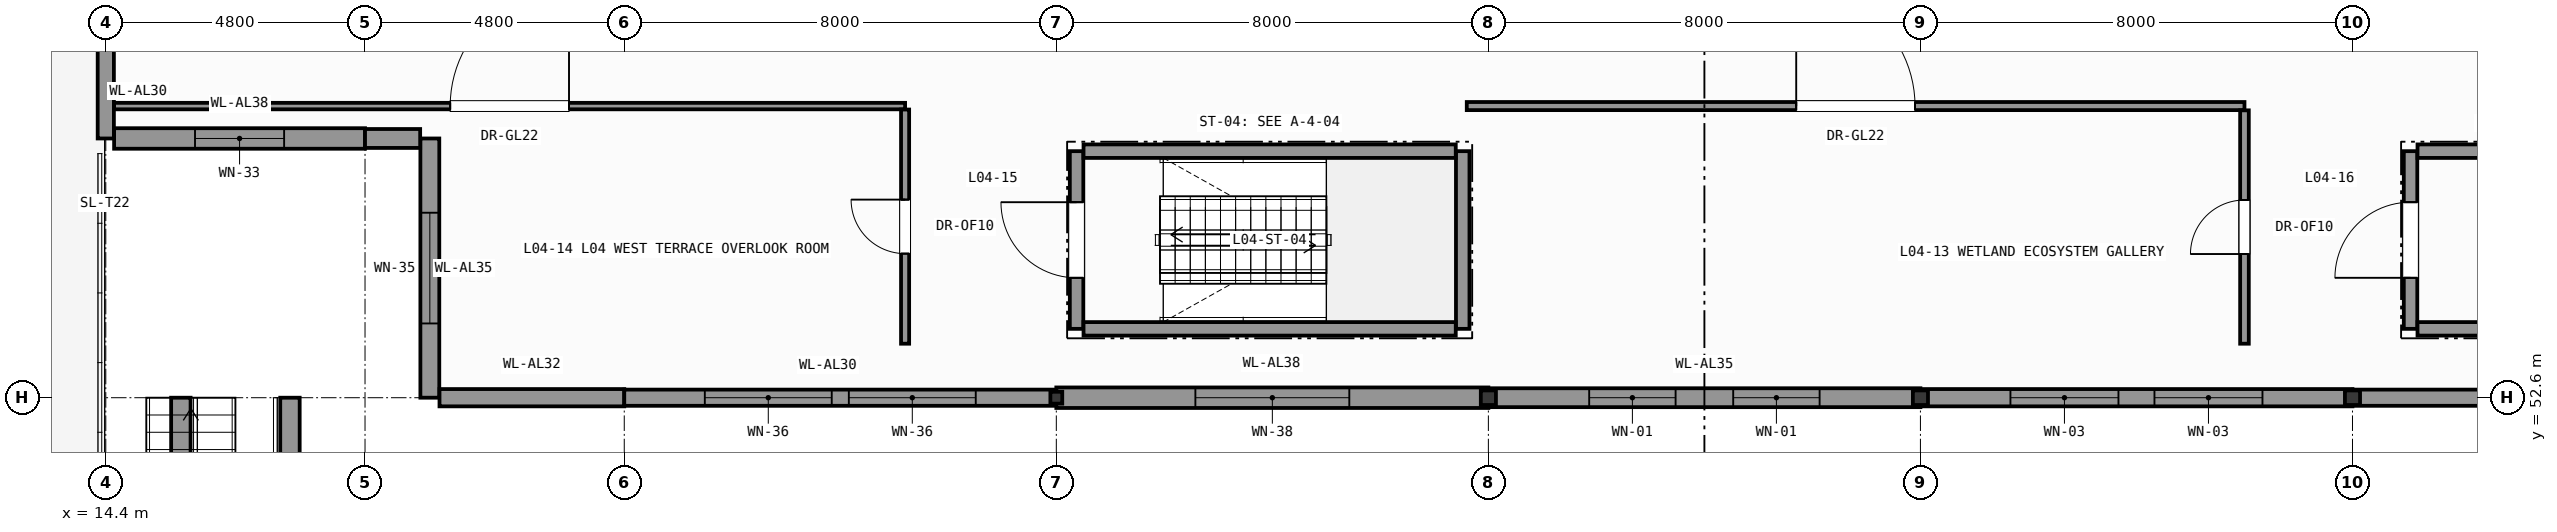
"""IFC4 building model, lengths in metres.
Left out: names, types, materials, properties, quantities, classifications, styles, units other than length and angle.
Written with IfcOpenShell. Run it as: python <this file> out.ifc"""

import sys

from ifc_helpers import new_model, si_unit, direction, frame, frame_2d, origin, origin_2d, place, context, subcontext, project, spatial, polyline, rectangle, hollow_rectangle, i_section, outline, extrude, element, fill, save


model = new_model("IFC4")
c1 = context("Model", 3, precision=1e-05, world=origin(), true_north=direction((0.0, 1.0)))
c2 = subcontext(c1, "Body", "Model", "MODEL_VIEW")
j1 = project(units=[si_unit("LENGTHUNIT", "METRE"), si_unit("PLANEANGLEUNIT", "RADIAN")], contexts=[c1])
p1 = place(None, origin())
s1 = spatial("IfcSite", under=j1, at=p1, CompositionType="ELEMENT")
p2 = place(p1, origin())
s2 = spatial("IfcBuilding", under=s1, at=p2, CompositionType="ELEMENT")
p3 = place(p2, frame((0.0, 0.0, 18.0)))
s3 = spatial("IfcBuildingStorey", under=s2, at=p3, CompositionType="ELEMENT", Elevation=18.0)
p4 = place(p3, frame((32.0, 52.6, 0.0), z_axis=(0.0, 0.0, 1.0), x_axis=(1.0, 0.0, 0.0)))
e1 = element("IfcColumn", 1, at=p4, inside=s3, PredefinedType="COLUMN", context=c2, shape_type="SweptSolid", body=[
    extrude(hollow_rectangle(XDim=0.22, YDim=0.22, WallThickness=0.012, InnerFilletRadius=0.012, OuterFilletRadius=0.024, at=origin_2d()), origin(), (0.0, 0.0, 1.0), 4.2),
])
for number, where, z_axis, x_axis in (
    (2, (40.0, 52.6, 0.0), (0.0, 0.0, 1.0), (1.0, 0.0, 0.0)),
    (3, (48.0, 52.6, 0.0), (0.0, 0.0, 1.0), (1.0, 0.0, 0.0)),
    (4, (56.0, 52.6, 0.0), (0.0, 0.0, 1.0), (1.0, 0.0, 0.0)),
):
    element("IfcColumn", number, at=place(p3, frame(where, z_axis=z_axis, x_axis=x_axis)), inside=s3, PredefinedType="COLUMN", context=c2, shape_type="SweptSolid", body=[
        extrude(i_section(OverallWidth=0.28, OverallDepth=0.27, WebThickness=0.008, FlangeThickness=0.013, FilletRadius=0.024, at=origin_2d()), origin(), (0.0, 0.0, 1.0), 4.2),
    ])
p5 = place(p3, frame((20.4, 52.6, 0.0), z_axis=(0.0, 0.0, 1.0), x_axis=(0.0, 1.0, 0.0)))
e5 = element("IfcWall", 5, at=p5, inside=s3, PredefinedType="SOLIDWALL", context=c2, shape_type="SweptSolid", body=[
    extrude(rectangle(XDim=4.8, YDim=0.35, at=frame_2d((2.4, 0.0))), origin(), (0.0, 0.0, 1.0), 3.98),
])
p6 = place(p5, frame((1.375, 0.0, 0.95)))
e6 = element("IfcOpeningElement", 6, at=p6, cuts=e5, PredefinedType="OPENING", context=c2, shape_type="SweptSolid", body=[
    extrude(rectangle(XDim=2.05, YDim=2.63, at=frame_2d((1.025, 1.315))), frame((0.0, 0.185, 0.0), z_axis=(0.0, -1.0, 0.0), x_axis=(1.0, 0.0, 0.0)), (0.0, 0.0, 1.0), 0.37),
])
p7 = place(p3, frame((24.0, 52.6, 0.0), z_axis=(0.0, 0.0, 1.0), x_axis=(-1.0, 0.0, 0.0)))
e7 = element("IfcWall", 7, at=p7, inside=s3, PredefinedType="SOLIDWALL", context=c2, shape_type="SweptSolid", body=[
    extrude(rectangle(XDim=3.421, YDim=0.32, at=frame_2d((1.71, 0.0))), origin(), (0.0, 0.0, 1.0), 3.98),
])
p8 = place(p3, frame((32.0, 52.6, 0.0), z_axis=(0.0, 0.0, 1.0), x_axis=(-1.0, 0.0, 0.0)))
e8 = element("IfcWall", 8, at=p8, inside=s3, PredefinedType="SOLIDWALL", context=c2, shape_type="SweptSolid", body=[
    extrude(rectangle(XDim=8.0, YDim=0.3, at=frame_2d((4.0, 0.0))), origin(), (0.0, 0.0, 1.0), 3.98),
])
p9 = place(p8, frame((1.492, 0.0, 0.95)))
e9 = element("IfcOpeningElement", 9, at=p9, cuts=e8, PredefinedType="OPENING", context=c2, shape_type="SweptSolid", body=[
    extrude(rectangle(XDim=2.35, YDim=2.63, at=frame_2d((1.175, 1.315))), frame((0.0, 0.16, 0.0), z_axis=(0.0, -1.0, 0.0), x_axis=(1.0, 0.0, 0.0)), (0.0, 0.0, 1.0), 0.32),
])
p10 = place(p8, frame((4.158, 0.0, 0.95)))
e10 = element("IfcOpeningElement", 10, at=p10, cuts=e8, PredefinedType="OPENING", context=c2, shape_type="SweptSolid", body=[
    extrude(rectangle(XDim=2.35, YDim=2.63, at=frame_2d((1.175, 1.315))), frame((0.0, 0.16, 0.0), z_axis=(0.0, -1.0, 0.0), x_axis=(1.0, 0.0, 0.0)), (0.0, 0.0, 1.0), 0.32),
])
p11 = place(p3, frame((40.0, 52.6, 0.0), z_axis=(0.0, 0.0, 1.0), x_axis=(-1.0, 0.0, 0.0)))
e11 = element("IfcWall", 11, at=p11, inside=s3, PredefinedType="SOLIDWALL", context=c2, shape_type="SweptSolid", body=[
    extrude(rectangle(XDim=8.0, YDim=0.38, at=frame_2d((4.0, 0.0))), origin(), (0.0, 0.0, 1.0), 3.685),
])
p12 = place(p11, frame((2.575, 0.0, 0.95)))
e12 = element("IfcOpeningElement", 12, at=p12, cuts=e11, PredefinedType="OPENING", context=c2, shape_type="SweptSolid", body=[
    extrude(rectangle(XDim=2.85, YDim=2.33, at=frame_2d((1.425, 1.165))), frame((0.0, 0.2, 0.0), z_axis=(0.0, -1.0, 0.0), x_axis=(1.0, 0.0, 0.0)), (0.0, 0.0, 1.0), 0.4),
])
p13 = place(p3, frame((48.0, 52.6, 0.0), z_axis=(0.0, 0.0, 1.0), x_axis=(-1.0, 0.0, 0.0)))
e13 = element("IfcWall", 13, at=p13, inside=s3, PredefinedType="SOLIDWALL", context=c2, shape_type="SweptSolid", body=[
    extrude(rectangle(XDim=8.0, YDim=0.35, at=frame_2d((4.0, 0.0))), origin(), (0.0, 0.0, 1.0), 3.645),
])
p14 = place(p13, frame((1.867, 0.0, 0.95)))
e14 = element("IfcOpeningElement", 14, at=p14, cuts=e13, PredefinedType="OPENING", context=c2, shape_type="SweptSolid", body=[
    extrude(rectangle(XDim=1.6, YDim=2.29, at=frame_2d((0.8, 1.145))), frame((0.0, 0.185, 0.0), z_axis=(0.0, -1.0, 0.0), x_axis=(1.0, 0.0, 0.0)), (0.0, 0.0, 1.0), 0.37),
])
p15 = place(p13, frame((4.533, 0.0, 0.95)))
e15 = element("IfcOpeningElement", 15, at=p15, cuts=e13, PredefinedType="OPENING", context=c2, shape_type="SweptSolid", body=[
    extrude(rectangle(XDim=1.6, YDim=2.29, at=frame_2d((0.8, 1.145))), frame((0.0, 0.185, 0.0), z_axis=(0.0, -1.0, 0.0), x_axis=(1.0, 0.0, 0.0)), (0.0, 0.0, 1.0), 0.37),
])
p16 = place(p3, frame((56.0, 52.6, 0.0), z_axis=(0.0, 0.0, 1.0), x_axis=(-1.0, 0.0, 0.0)))
e16 = element("IfcWall", 16, at=p16, inside=s3, PredefinedType="SOLIDWALL", context=c2, shape_type="SweptSolid", body=[
    extrude(rectangle(XDim=8.0, YDim=0.32, at=frame_2d((4.0, 0.0))), origin(), (0.0, 0.0, 1.0), 3.565),
])
p17 = place(p16, frame((1.667, 0.0, 0.95)))
e17 = element("IfcOpeningElement", 17, at=p17, cuts=e16, PredefinedType="OPENING", context=c2, shape_type="SweptSolid", body=[
    extrude(rectangle(XDim=2.0, YDim=2.22, at=frame_2d((1.0, 1.11))), frame((0.0, 0.17, 0.0), z_axis=(0.0, -1.0, 0.0), x_axis=(1.0, 0.0, 0.0)), (0.0, 0.0, 1.0), 0.34),
])
p18 = place(p16, frame((4.333, 0.0, 0.95)))
e18 = element("IfcOpeningElement", 18, at=p18, cuts=e16, PredefinedType="OPENING", context=c2, shape_type="SweptSolid", body=[
    extrude(rectangle(XDim=2.0, YDim=2.22, at=frame_2d((1.0, 1.11))), frame((0.0, 0.17, 0.0), z_axis=(0.0, -1.0, 0.0), x_axis=(1.0, 0.0, 0.0)), (0.0, 0.0, 1.0), 0.34),
])
p19 = place(p3, frame((70.0, 52.6, 0.0), z_axis=(0.0, 0.0, 1.0), x_axis=(-1.0, 0.0, 0.0)))
e19 = element("IfcWall", 19, at=p19, inside=s3, PredefinedType="SOLIDWALL", context=c2, shape_type="SweptSolid", body=[
    extrude(rectangle(XDim=14.0, YDim=0.3, at=frame_2d((7.0, 0.0))), origin(), (0.0, 0.0, 1.0), 3.415),
])
p20 = place(p19, frame((3.867, 0.0, 0.95)))
e20 = element("IfcOpeningElement", 20, at=p20, cuts=e19, PredefinedType="OPENING", context=c2, shape_type="SweptSolid", body=[
    extrude(rectangle(XDim=1.6, YDim=2.06, at=frame_2d((0.8, 1.03))), frame((0.0, 0.16, 0.0), z_axis=(0.0, -1.0, 0.0), x_axis=(1.0, 0.0, 0.0)), (0.0, 0.0, 1.0), 0.32),
])
p21 = place(p19, frame((8.533, 0.0, 0.95)))
e21 = element("IfcOpeningElement", 21, at=p21, cuts=e19, PredefinedType="OPENING", context=c2, shape_type="SweptSolid", body=[
    extrude(rectangle(XDim=1.6, YDim=2.06, at=frame_2d((0.8, 1.03))), frame((0.0, 0.16, 0.0), z_axis=(0.0, -1.0, 0.0), x_axis=(1.0, 0.0, 0.0)), (0.0, 0.0, 1.0), 0.32),
])
p22 = place(p3, frame((14.4, 57.4, 0.0), z_axis=(0.0, 0.0, 1.0), x_axis=(0.0, 1.0, 0.0)))
e22 = element("IfcWall", 22, at=p22, inside=s3, PredefinedType="SOLIDWALL", context=c2, shape_type="SweptSolid", body=[
    extrude(rectangle(XDim=2.2, YDim=0.3, at=frame_2d((1.1, 0.0))), origin(), (0.0, 0.0, 1.0), 3.98),
])
p23 = place(p3, frame((19.2, 57.4, 0.0), z_axis=(0.0, 0.0, 1.0), x_axis=(-1.0, 0.0, 0.0)))
e23 = element("IfcWall", 23, at=p23, inside=s3, PredefinedType="SOLIDWALL", context=c2, shape_type="SweptSolid", body=[
    extrude(rectangle(XDim=4.646, YDim=0.38, at=frame_2d((2.323, 0.0))), origin(), (0.0, 0.0, 1.0), 3.98),
])
p24 = place(p23, frame((1.498, 0.0, 0.95)))
e24 = element("IfcOpeningElement", 24, at=p24, cuts=e23, PredefinedType="OPENING", context=c2, shape_type="SweptSolid", body=[
    extrude(rectangle(XDim=1.65, YDim=2.63, at=frame_2d((0.825, 1.315))), frame((0.0, 0.2, 0.0), z_axis=(0.0, -1.0, 0.0), x_axis=(1.0, 0.0, 0.0)), (0.0, 0.0, 1.0), 0.4),
])
p25 = place(p3, frame((20.221, 57.4, 0.0), z_axis=(0.0, 0.0, 1.0), x_axis=(-1.0, 0.0, 0.0)))
e25 = element("IfcWall", 25, at=p25, inside=s3, PredefinedType="SOLIDWALL", context=c2, shape_type="SweptSolid", body=[
    extrude(rectangle(XDim=1.021, YDim=0.35, at=frame_2d((0.51, 0.0))), origin(), (0.0, 0.0, 1.0), 3.98),
])
for number, where, z_axis, x_axis in (
    (26, (15.79, 43.71, -18.0), (0.0, 0.0, 1.0), (0.0, 1.0, 0.0)),
    (27, (17.81, 43.71, -18.0), (0.0, 0.0, 1.0), (0.0, 1.0, 0.0)),
):
    element("IfcWall", number, at=place(p3, frame(where, z_axis=z_axis, x_axis=x_axis)), inside=s3, PredefinedType="SOLIDWALL", context=c2, shape_type="SweptSolid", body=[
        extrude(outline(polyline([(0.0, 0.0), (8.89, 0.0), (8.89, 23.45), (0.0, 19.25), (0.0, 0.0)])), frame((0.0, 0.18, 0.0), z_axis=(0.0, -1.0, 0.0), x_axis=(1.0, 0.0, 0.0)), (0.0, 0.0, 1.0), 0.36),
    ])
p26 = place(p3, frame((57.075, 53.875, 0.0), z_axis=(0.0, 0.0, 1.0), x_axis=(0.0, 1.0, 0.0)))
e28 = element("IfcWall", 28, at=p26, inside=s3, PredefinedType="SHEAR", context=c2, shape_type="SweptSolid", body=[
    extrude(rectangle(XDim=3.29, YDim=0.25, at=frame_2d((1.645, 0.0))), origin(), (0.0, 0.0, 1.0), 3.98),
])
p27 = place(p26, frame((0.945, 0.0, 0.0)))
e29 = element("IfcOpeningElement", 29, at=p27, cuts=e28, PredefinedType="OPENING", context=c2, shape_type="SweptSolid", body=[
    extrude(rectangle(XDim=1.4, YDim=2.2, at=frame_2d((0.7, 1.1))), frame((0.0, 0.135, 0.0), z_axis=(0.0, -1.0, 0.0), x_axis=(1.0, 0.0, 0.0)), (0.0, 0.0, 1.0), 0.27),
])
for number, where, z_axis, x_axis in (
    (30, (57.204, 53.875, 0.0), (0.0, 0.0, 1.0), (1.0, 0.0, 0.0)),
    (31, (57.204, 57.165, 0.0), (0.0, 0.0, 1.0), (1.0, 0.0, 0.0)),
):
    element("IfcWall", number, at=place(p3, frame(where, z_axis=z_axis, x_axis=x_axis)), inside=s3, PredefinedType="SHEAR", context=c2, shape_type="SweptSolid", body=[
        extrude(rectangle(XDim=7.192, YDim=0.25, at=frame_2d((3.596, 0.0))), origin(), (0.0, 0.0, 1.0), 3.98),
    ])
p28 = place(p3, frame((32.375, 53.875, 0.0), z_axis=(0.0, 0.0, 1.0), x_axis=(0.0, 1.0, 0.0)))
e32 = element("IfcWall", 32, at=p28, inside=s3, PredefinedType="SHEAR", context=c2, shape_type="SweptSolid", body=[
    extrude(rectangle(XDim=3.29, YDim=0.25, at=frame_2d((1.645, 0.0))), origin(), (0.0, 0.0, 1.0), 3.98),
])
p29 = place(p28, frame((0.945, 0.0, 0.0)))
e33 = element("IfcOpeningElement", 33, at=p29, cuts=e32, PredefinedType="OPENING", context=c2, shape_type="SweptSolid", body=[
    extrude(rectangle(XDim=1.4, YDim=2.2, at=frame_2d((0.7, 1.1))), frame((0.0, 0.135, 0.0), z_axis=(0.0, -1.0, 0.0), x_axis=(1.0, 0.0, 0.0)), (0.0, 0.0, 1.0), 0.27),
])
p30 = place(p3, frame((39.525, 53.875, 0.0), z_axis=(0.0, 0.0, 1.0), x_axis=(0.0, 1.0, 0.0)))
e34 = element("IfcWall", 34, at=p30, inside=s3, PredefinedType="SHEAR", context=c2, shape_type="SweptSolid", body=[
    extrude(rectangle(XDim=3.29, YDim=0.25, at=frame_2d((1.645, 0.0))), origin(), (0.0, 0.0, 1.0), 3.98),
])
for number, where, z_axis, x_axis in (
    (35, (32.504, 53.875, 0.0), (0.0, 0.0, 1.0), (1.0, 0.0, 0.0)),
    (36, (32.504, 57.165, 0.0), (0.0, 0.0, 1.0), (1.0, 0.0, 0.0)),
):
    element("IfcWall", number, at=place(p3, frame(where, z_axis=z_axis, x_axis=x_axis)), inside=s3, PredefinedType="SHEAR", context=c2, shape_type="SweptSolid", body=[
        extrude(rectangle(XDim=6.892, YDim=0.25, at=frame_2d((3.446, 0.0))), origin(), (0.0, 0.0, 1.0), 3.98),
    ])
p31 = place(p3, frame((39.6, 58.0, 0.0), z_axis=(0.0, 0.0, 1.0), x_axis=(1.0, 0.0, 0.0)))
e37 = element("IfcWall", 37, at=p31, inside=s3, PredefinedType="PARTITIONING", context=c2, shape_type="SweptSolid", body=[
    extrude(rectangle(XDim=14.4, YDim=0.15, at=frame_2d((7.2, 0.0))), origin(), (0.0, 0.0, 1.0), 3.98),
])
p32 = place(p31, frame((6.1, 0.0, 0.0)))
e38 = element("IfcOpeningElement", 38, at=p32, cuts=e37, PredefinedType="OPENING", context=c2, shape_type="SweptSolid", body=[
    extrude(rectangle(XDim=2.2, YDim=2.6, at=frame_2d((1.1, 1.3))), frame((0.0, 0.085, 0.0), z_axis=(0.0, -1.0, 0.0), x_axis=(1.0, 0.0, 0.0)), (0.0, 0.0, 1.0), 0.17),
])
p33 = place(p3, frame((14.554, 58.0, 0.0), z_axis=(0.0, 0.0, 1.0), x_axis=(1.0, 0.0, 0.0)))
e39 = element("IfcWall", 39, at=p33, inside=s3, PredefinedType="PARTITIONING", context=c2, shape_type="SweptSolid", body=[
    extrude(rectangle(XDim=14.646, YDim=0.12, at=frame_2d((7.323, 0.0))), origin(), (0.0, 0.0, 1.0), 3.98),
])
p34 = place(p33, frame((6.223, 0.0, 0.0)))
e40 = element("IfcOpeningElement", 40, at=p34, cuts=e39, PredefinedType="OPENING", context=c2, shape_type="SweptSolid", body=[
    extrude(rectangle(XDim=2.2, YDim=2.6, at=frame_2d((1.1, 1.3))), frame((0.0, 0.07, 0.0), z_axis=(0.0, -1.0, 0.0), x_axis=(1.0, 0.0, 0.0)), (0.0, 0.0, 1.0), 0.14),
])
p35 = place(p3, frame((54.0, 53.6, 0.0), z_axis=(0.0, 0.0, 1.0), x_axis=(0.0, 1.0, 0.0)))
e41 = element("IfcWall", 41, at=p35, inside=s3, PredefinedType="PARTITIONING", context=c2, shape_type="SweptSolid", body=[
    extrude(rectangle(XDim=4.321, YDim=0.16, at=frame_2d((2.16, 0.0))), origin(), (0.0, 0.0, 1.0), 3.98),
])
p36 = place(p35, frame((1.66, 0.0, 0.0)))
e42 = element("IfcOpeningElement", 42, at=p36, cuts=e41, PredefinedType="OPENING", context=c2, shape_type="SweptSolid", body=[
    extrude(rectangle(XDim=1.0, YDim=2.15, at=frame_2d((0.5, 1.075))), frame((0.0, 0.09, 0.0), z_axis=(0.0, -1.0, 0.0), x_axis=(1.0, 0.0, 0.0)), (0.0, 0.0, 1.0), 0.18),
])
p37 = place(p3, frame((29.2, 53.6, 0.0), z_axis=(0.0, 0.0, 1.0), x_axis=(0.0, 1.0, 0.0)))
e43 = element("IfcWall", 43, at=p37, inside=s3, PredefinedType="PARTITIONING", context=c2, shape_type="SweptSolid", body=[
    extrude(rectangle(XDim=4.336, YDim=0.15, at=frame_2d((2.168, 0.0))), origin(), (0.0, 0.0, 1.0), 3.98),
])
p38 = place(p37, frame((1.668, 0.0, 0.0)))
e44 = element("IfcOpeningElement", 44, at=p38, cuts=e43, PredefinedType="OPENING", context=c2, shape_type="SweptSolid", body=[
    extrude(rectangle(XDim=1.0, YDim=2.15, at=frame_2d((0.5, 1.075))), frame((0.0, 0.085, 0.0), z_axis=(0.0, -1.0, 0.0), x_axis=(1.0, 0.0, 0.0)), (0.0, 0.0, 1.0), 0.17),
])
p39 = place(p6, origin())
e45 = element("IfcWindow", 45, at=p39, inside=s3, PartitioningType="SINGLE_PANEL", PredefinedType="WINDOW", context=c2, shape_type="SweptSolid", body=[
    extrude(rectangle(XDim=2.05, YDim=2.63, at=frame_2d((1.025, 1.315))), frame((0.0, 0.03, 0.0), z_axis=(0.0, -1.0, 0.0), x_axis=(1.0, 0.0, 0.0)), (0.0, 0.0, 1.0), 0.06),
])
fill(e6, e45)
p40 = place(p9, origin())
e46 = element("IfcWindow", 46, at=p40, inside=s3, PartitioningType="SINGLE_PANEL", PredefinedType="WINDOW", context=c2, shape_type="SweptSolid", body=[
    extrude(rectangle(XDim=2.35, YDim=2.63, at=frame_2d((1.175, 1.315))), frame((0.0, 0.03, 0.0), z_axis=(0.0, -1.0, 0.0), x_axis=(1.0, 0.0, 0.0)), (0.0, 0.0, 1.0), 0.06),
])
fill(e9, e46)
p41 = place(p10, origin())
e47 = element("IfcWindow", 47, at=p41, inside=s3, PartitioningType="SINGLE_PANEL", PredefinedType="WINDOW", context=c2, shape_type="SweptSolid", body=[
    extrude(rectangle(XDim=2.35, YDim=2.63, at=frame_2d((1.175, 1.315))), frame((0.0, 0.03, 0.0), z_axis=(0.0, -1.0, 0.0), x_axis=(1.0, 0.0, 0.0)), (0.0, 0.0, 1.0), 0.06),
])
fill(e10, e47)
p42 = place(p12, origin())
e48 = element("IfcWindow", 48, at=p42, inside=s3, PartitioningType="SINGLE_PANEL", PredefinedType="WINDOW", context=c2, shape_type="SweptSolid", body=[
    extrude(rectangle(XDim=2.85, YDim=2.33, at=frame_2d((1.425, 1.165))), frame((0.0, 0.03, 0.0), z_axis=(0.0, -1.0, 0.0), x_axis=(1.0, 0.0, 0.0)), (0.0, 0.0, 1.0), 0.06),
])
fill(e12, e48)
p43 = place(p14, origin())
e49 = element("IfcWindow", 49, at=p43, inside=s3, PartitioningType="SINGLE_PANEL", PredefinedType="WINDOW", context=c2, shape_type="SweptSolid", body=[
    extrude(rectangle(XDim=1.6, YDim=2.29, at=frame_2d((0.8, 1.145))), frame((0.0, 0.03, 0.0), z_axis=(0.0, -1.0, 0.0), x_axis=(1.0, 0.0, 0.0)), (0.0, 0.0, 1.0), 0.06),
])
fill(e14, e49)
p44 = place(p15, origin())
e50 = element("IfcWindow", 50, at=p44, inside=s3, PartitioningType="SINGLE_PANEL", PredefinedType="WINDOW", context=c2, shape_type="SweptSolid", body=[
    extrude(rectangle(XDim=1.6, YDim=2.29, at=frame_2d((0.8, 1.145))), frame((0.0, 0.03, 0.0), z_axis=(0.0, -1.0, 0.0), x_axis=(1.0, 0.0, 0.0)), (0.0, 0.0, 1.0), 0.06),
])
fill(e15, e50)
p45 = place(p17, origin())
e51 = element("IfcWindow", 51, at=p45, inside=s3, PartitioningType="SINGLE_PANEL", PredefinedType="WINDOW", context=c2, shape_type="SweptSolid", body=[
    extrude(rectangle(XDim=2.0, YDim=2.22, at=frame_2d((1.0, 1.11))), frame((0.0, 0.03, 0.0), z_axis=(0.0, -1.0, 0.0), x_axis=(1.0, 0.0, 0.0)), (0.0, 0.0, 1.0), 0.06),
])
fill(e17, e51)
p46 = place(p18, origin())
e52 = element("IfcWindow", 52, at=p46, inside=s3, PartitioningType="SINGLE_PANEL", PredefinedType="WINDOW", context=c2, shape_type="SweptSolid", body=[
    extrude(rectangle(XDim=2.0, YDim=2.22, at=frame_2d((1.0, 1.11))), frame((0.0, 0.03, 0.0), z_axis=(0.0, -1.0, 0.0), x_axis=(1.0, 0.0, 0.0)), (0.0, 0.0, 1.0), 0.06),
])
fill(e18, e52)
p47 = place(p24, origin())
e53 = element("IfcWindow", 53, at=p47, inside=s3, PartitioningType="SINGLE_PANEL", PredefinedType="WINDOW", context=c2, shape_type="SweptSolid", body=[
    extrude(rectangle(XDim=1.65, YDim=2.63, at=frame_2d((0.825, 1.315))), frame((0.0, 0.03, 0.0), z_axis=(0.0, -1.0, 0.0), x_axis=(1.0, 0.0, 0.0)), (0.0, 0.0, 1.0), 0.06),
])
fill(e24, e53)
p48 = place(p27, origin())
e54 = element("IfcDoor", 54, at=p48, inside=s3, OperationType="SINGLE_SWING_LEFT", PredefinedType="DOOR", context=c2, shape_type="SweptSolid", body=[
    extrude(rectangle(XDim=1.4, YDim=2.2, at=frame_2d((0.7, 1.1))), frame((0.0, 0.025, 0.0), z_axis=(0.0, -1.0, 0.0), x_axis=(1.0, 0.0, 0.0)), (0.0, 0.0, 1.0), 0.05),
])
fill(e29, e54)
p49 = place(p29, origin())
e55 = element("IfcDoor", 55, at=p49, inside=s3, OperationType="SINGLE_SWING_RIGHT", PredefinedType="DOOR", context=c2, shape_type="SweptSolid", body=[
    extrude(rectangle(XDim=1.4, YDim=2.2, at=frame_2d((0.7, 1.1))), frame((0.0, 0.025, 0.0), z_axis=(0.0, -1.0, 0.0), x_axis=(1.0, 0.0, 0.0)), (0.0, 0.0, 1.0), 0.05),
])
fill(e33, e55)
p50 = place(p32, origin())
e56 = element("IfcDoor", 56, at=p50, inside=s3, OperationType="SINGLE_SWING_LEFT", PredefinedType="DOOR", context=c2, shape_type="SweptSolid", body=[
    extrude(rectangle(XDim=2.2, YDim=2.6, at=frame_2d((1.1, 1.3))), frame((0.0, 0.025, 0.0), z_axis=(0.0, -1.0, 0.0), x_axis=(1.0, 0.0, 0.0)), (0.0, 0.0, 1.0), 0.05),
])
fill(e38, e56)
p51 = place(p34, origin())
e57 = element("IfcDoor", 57, at=p51, inside=s3, OperationType="SINGLE_SWING_RIGHT", PredefinedType="DOOR", context=c2, shape_type="SweptSolid", body=[
    extrude(rectangle(XDim=2.2, YDim=2.6, at=frame_2d((1.1, 1.3))), frame((0.0, 0.025, 0.0), z_axis=(0.0, -1.0, 0.0), x_axis=(1.0, 0.0, 0.0)), (0.0, 0.0, 1.0), 0.05),
])
fill(e40, e57)
p52 = place(p36, origin())
e58 = element("IfcDoor", 58, at=p52, inside=s3, OperationType="SINGLE_SWING_LEFT", PredefinedType="DOOR", context=c2, shape_type="SweptSolid", body=[
    extrude(rectangle(XDim=1.0, YDim=2.15, at=frame_2d((0.5, 1.075))), frame((0.0, 0.025, 0.0), z_axis=(0.0, -1.0, 0.0), x_axis=(1.0, 0.0, 0.0)), (0.0, 0.0, 1.0), 0.05),
])
fill(e42, e58)
p53 = place(p38, origin())
e59 = element("IfcDoor", 59, at=p53, inside=s3, OperationType="SINGLE_SWING_RIGHT", PredefinedType="DOOR", context=c2, shape_type="SweptSolid", body=[
    extrude(rectangle(XDim=1.0, YDim=2.15, at=frame_2d((0.5, 1.075))), frame((0.0, 0.025, 0.0), z_axis=(0.0, -1.0, 0.0), x_axis=(1.0, 0.0, 0.0)), (0.0, 0.0, 1.0), 0.05),
])
fill(e44, e59)
save(model, sys.argv[1])
